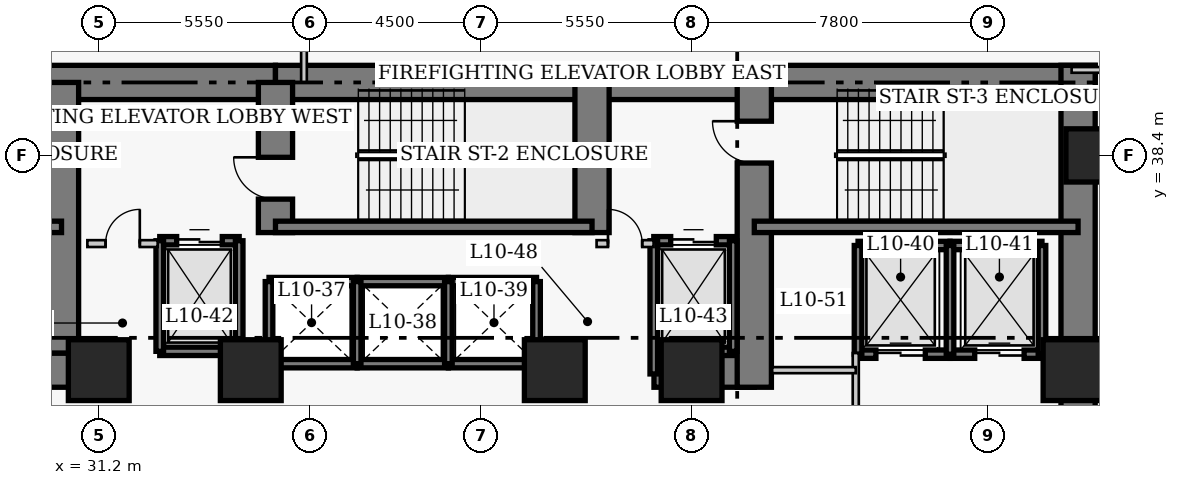
"""IFC4 building model, lengths in metres.
Left out: names, types, materials, properties, quantities, classifications, styles, units other than length and angle.
Written with IfcOpenShell. Run it as: python <this file> out.ifc"""

import sys

from ifc_helpers import new_model, si_unit, direction, frame, frame_2d, origin, origin_2d, place, context, subcontext, project, spatial, rectangle, extrude, element, fill, save


model = new_model("IFC4")
c1 = context("Model", 3, precision=1e-05, world=origin(), true_north=direction((0.0, 1.0)))
c2 = subcontext(c1, "Body", "Model", "MODEL_VIEW")
j1 = project(units=[si_unit("LENGTHUNIT", "METRE"), si_unit("PLANEANGLEUNIT", "RADIAN")], contexts=[c1])
p1 = place(None, origin())
s1 = spatial("IfcSite", under=j1, at=p1, CompositionType="ELEMENT")
p2 = place(p1, origin())
s2 = spatial("IfcBuilding", under=s1, at=p2, CompositionType="ELEMENT")
p3 = place(p2, frame((0.0, 0.0, 45.0)))
s3 = spatial("IfcBuildingStorey", under=s2, at=p3, CompositionType="ELEMENT", Elevation=45.0)
p4 = place(p3, frame((21.45, 40.32, 0.0), z_axis=(0.0, 0.0, 1.0), x_axis=(1.0, 0.0, 0.0)))
e1 = element("IfcWall", 1, at=p4, inside=s3, PredefinedType="SHEAR", context=c2, shape_type="SweptSolid", body=[
    extrude(rectangle(XDim=14.4, YDim=0.9, at=frame_2d((7.2, 0.0))), origin(), (0.0, 0.0, 1.0), 3.8),
])
p5 = place(p3, frame((35.85, 40.32, 0.0), z_axis=(0.0, 0.0, 1.0), x_axis=(1.0, 0.0, 0.0)))
e2 = element("IfcWall", 2, at=p5, inside=s3, PredefinedType="SHEAR", context=c2, shape_type="SweptSolid", body=[
    extrude(rectangle(XDim=12.6, YDim=0.9, at=frame_2d((6.3, 0.0))), origin(), (0.0, 0.0, 1.0), 3.8),
])
p6 = place(p3, frame((48.45, 40.32, 0.0), z_axis=(0.0, 0.0, 1.0), x_axis=(1.0, 0.0, 0.0)))
e3 = element("IfcWall", 3, at=p6, inside=s3, PredefinedType="SHEAR", context=c2, shape_type="SweptSolid", body=[
    extrude(rectangle(XDim=8.97, YDim=0.9, at=frame_2d((4.485, 0.0))), origin(), (0.0, 0.0, 1.0), 3.8),
])
p7 = place(p3, frame((56.97, 27.05, 0.0), z_axis=(0.0, 0.0, 1.0), x_axis=(0.0, 1.0, 0.0)))
e4 = element("IfcWall", 4, at=p7, inside=s3, PredefinedType="SHEAR", context=c2, shape_type="SweptSolid", body=[
    extrude(rectangle(XDim=13.72, YDim=0.9, at=frame_2d((6.86, 0.0))), origin(), (0.0, 0.0, 1.0), 3.8),
])
p8 = place(p3, frame((28.45, 32.75, 0.0), z_axis=(0.0, 0.0, 1.0), x_axis=(1.0, 0.0, 0.0)))
e5 = element("IfcWall", 5, at=p8, inside=s3, PredefinedType="SHEAR", context=c2, shape_type="SweptSolid", body=[
    extrude(rectangle(XDim=2.4, YDim=0.9, at=frame_2d((1.2, 0.0))), origin(), (0.0, 0.0, 1.0), 3.8),
])
p9 = place(p3, frame((45.81, 32.75, 0.0), z_axis=(0.0, 0.0, 1.0), x_axis=(1.0, 0.0, 0.0)))
e6 = element("IfcWall", 6, at=p9, inside=s3, PredefinedType="SHEAR", context=c2, shape_type="SweptSolid", body=[
    extrude(rectangle(XDim=2.64, YDim=0.9, at=frame_2d((1.32, 0.0))), origin(), (0.0, 0.0, 1.0), 3.8),
])
p10 = place(p3, frame((30.22, 33.2, 0.0), z_axis=(0.0, 0.0, 1.0), x_axis=(0.0, 1.0, 0.0)))
e7 = element("IfcWall", 7, at=p10, inside=s3, PredefinedType="SHEAR", context=c2, shape_type="SweptSolid", body=[
    extrude(rectangle(XDim=7.12, YDim=0.9, at=frame_2d((3.56, 0.0))), origin(), (0.0, 0.0, 1.0), 3.8),
])
p11 = place(p3, frame((35.85, 36.37, 0.0), z_axis=(0.0, 0.0, 1.0), x_axis=(0.0, 1.0, 0.0)))
e8 = element("IfcWall", 8, at=p11, inside=s3, PredefinedType="SHEAR", context=c2, shape_type="SweptSolid", body=[
    extrude(rectangle(XDim=3.95, YDim=0.9, at=frame_2d((1.975, 0.0))), origin(), (0.0, 0.0, 1.0), 3.8),
])
p12 = place(p11, frame((0.88, 0.0, 0.0)))
e9 = element("IfcOpeningElement", 9, at=p12, cuts=e8, PredefinedType="OPENING", context=c2, shape_type="SweptSolid", body=[
    extrude(rectangle(XDim=1.1, YDim=2.15, at=frame_2d((0.55, 1.075))), frame((0.0, 0.46, 0.0), z_axis=(0.0, -1.0, 0.0), x_axis=(1.0, 0.0, 0.0)), (0.0, 0.0, 1.0), 0.92),
])
p13 = place(p3, frame((44.18, 36.37, 0.0), z_axis=(0.0, 0.0, 1.0), x_axis=(0.0, 1.0, 0.0)))
e10 = element("IfcWall", 10, at=p13, inside=s3, PredefinedType="SHEAR", context=c2, shape_type="SweptSolid", body=[
    extrude(rectangle(XDim=3.95, YDim=0.9, at=frame_2d((1.975, 0.0))), origin(), (0.0, 0.0, 1.0), 3.8),
])
p14 = place(p3, frame((48.45, 32.3, 0.0), z_axis=(0.0, 0.0, 1.0), x_axis=(0.0, 1.0, 0.0)))
e11 = element("IfcWall", 11, at=p14, inside=s3, PredefinedType="SHEAR", context=c2, shape_type="SweptSolid", body=[
    extrude(rectangle(XDim=8.02, YDim=0.9, at=frame_2d((4.01, 0.0))), origin(), (0.0, 0.0, 1.0), 3.8),
])
p15 = place(p14, frame((5.9, 0.0, 0.0)))
e12 = element("IfcOpeningElement", 12, at=p15, cuts=e11, PredefinedType="OPENING", context=c2, shape_type="SweptSolid", body=[
    extrude(rectangle(XDim=1.1, YDim=2.15, at=frame_2d((0.55, 1.075))), frame((0.0, 0.46, 0.0), z_axis=(0.0, -1.0, 0.0), x_axis=(1.0, 0.0, 0.0)), (0.0, 0.0, 1.0), 0.92),
])
p16 = place(p3, frame((21.9, 36.52, 0.0), z_axis=(0.0, 0.0, 1.0), x_axis=(1.0, 0.0, 0.0)))
e13 = element("IfcWall", 13, at=p16, inside=s3, PredefinedType="SHEAR", context=c2, shape_type="SweptSolid", body=[
    extrude(rectangle(XDim=8.32, YDim=0.3, at=frame_2d((4.16, 0.0))), origin(), (0.0, 0.0, 1.0), 3.8),
])
p17 = place(p16, frame((0.9, 0.0, 0.0)))
e14 = element("IfcOpeningElement", 14, at=p17, cuts=e13, PredefinedType="OPENING", context=c2, shape_type="SweptSolid", body=[
    extrude(rectangle(XDim=1.1, YDim=2.15, at=frame_2d((0.55, 1.075))), frame((0.0, 0.16, 0.0), z_axis=(0.0, -1.0, 0.0), x_axis=(1.0, 0.0, 0.0)), (0.0, 0.0, 1.0), 0.32),
])
p18 = place(p3, frame((35.85, 36.52, 0.0), z_axis=(0.0, 0.0, 1.0), x_axis=(1.0, 0.0, 0.0)))
e15 = element("IfcWall", 15, at=p18, inside=s3, PredefinedType="SHEAR", context=c2, shape_type="SweptSolid", body=[
    extrude(rectangle(XDim=8.33, YDim=0.3, at=frame_2d((4.165, 0.0))), origin(), (0.0, 0.0, 1.0), 3.8),
])
p19 = place(p3, frame((48.45, 36.52, 0.0), z_axis=(0.0, 0.0, 1.0), x_axis=(1.0, 0.0, 0.0)))
e16 = element("IfcWall", 16, at=p19, inside=s3, PredefinedType="SHEAR", context=c2, shape_type="SweptSolid", body=[
    extrude(rectangle(XDim=8.52, YDim=0.3, at=frame_2d((4.26, 0.0))), origin(), (0.0, 0.0, 1.0), 3.8),
])
p20 = place(p3, frame((57.35, 38.4, 0.0), z_axis=(0.0, 0.0, 1.0), x_axis=(1.0, 0.0, 0.0)))
e17 = element("IfcColumn", 17, at=p20, inside=s3, PredefinedType="COLUMN", context=c2, shape_type="SweptSolid", body=[
    extrude(rectangle(XDim=1.4, YDim=1.4, at=origin_2d()), origin(), (0.0, 0.0, 1.0), 3.8),
])
for number, where, z_axis, x_axis in (
    (18, (31.2, 32.75, 0.0), (0.0, 0.0, 1.0), (1.0, 0.0, 0.0)),
    (19, (35.2, 32.75, 0.0), (0.0, 0.0, 1.0), (1.0, 0.0, 0.0)),
    (20, (43.2, 32.75, 0.0), (0.0, 0.0, 1.0), (1.0, 0.0, 0.0)),
    (21, (46.8, 32.75, 0.0), (0.0, 0.0, 1.0), (1.0, 0.0, 0.0)),
    (22, (56.85, 32.75, 0.0), (0.0, 0.0, 1.0), (1.0, 0.0, 0.0)),
):
    element("IfcColumn", number, at=place(p3, frame(where, z_axis=z_axis, x_axis=x_axis)), inside=s3, PredefinedType="COLUMN", context=c2, shape_type="SweptSolid", body=[
        extrude(rectangle(XDim=1.6, YDim=1.6, at=origin_2d()), origin(), (0.0, 0.0, 1.0), 3.8),
    ])
for number, where, z_axis, x_axis in (
    (23, (35.68, 35.08, 0.0), (0.0, 0.0, 1.0), (1.0, 0.0, 0.0)),
    (24, (35.68, 32.92, 0.0), (0.0, 0.0, 1.0), (1.0, 0.0, 0.0)),
):
    element("IfcWall", number, at=place(p3, frame(where, z_axis=z_axis, x_axis=x_axis)), inside=s3, PredefinedType="SHEAR", context=c2, shape_type="SweptSolid", body=[
        extrude(rectangle(XDim=2.32, YDim=0.22, at=frame_2d((1.16, 0.0))), origin(), (0.0, 0.0, 1.0), 3.8),
    ])
p21 = place(p3, frame((35.68, 32.92, 0.0), z_axis=(0.0, 0.0, 1.0), x_axis=(0.0, 1.0, 0.0)))
e25 = element("IfcWall", 25, at=p21, inside=s3, PredefinedType="SHEAR", context=c2, shape_type="SweptSolid", body=[
    extrude(rectangle(XDim=2.16, YDim=0.2, at=frame_2d((1.08, 0.0))), origin(), (0.0, 0.0, 1.0), 3.8),
])
for number, where, z_axis, x_axis in (
    (26, (38.0, 35.08, 0.0), (0.0, 0.0, 1.0), (1.0, 0.0, 0.0)),
    (27, (38.0, 32.92, 0.0), (0.0, 0.0, 1.0), (1.0, 0.0, 0.0)),
):
    element("IfcWall", number, at=place(p3, frame(where, z_axis=z_axis, x_axis=x_axis)), inside=s3, PredefinedType="SHEAR", context=c2, shape_type="SweptSolid", body=[
        extrude(rectangle(XDim=2.4, YDim=0.22, at=frame_2d((1.2, 0.0))), origin(), (0.0, 0.0, 1.0), 3.8),
    ])
p22 = place(p3, frame((38.0, 32.92, 0.0), z_axis=(0.0, 0.0, 1.0), x_axis=(0.0, 1.0, 0.0)))
e28 = element("IfcWall", 28, at=p22, inside=s3, PredefinedType="SHEAR", context=c2, shape_type="SweptSolid", body=[
    extrude(rectangle(XDim=2.16, YDim=0.2, at=frame_2d((1.08, 0.0))), origin(), (0.0, 0.0, 1.0), 3.8),
])
for number, where, z_axis, x_axis in (
    (29, (40.4, 35.08, 0.0), (0.0, 0.0, 1.0), (1.0, 0.0, 0.0)),
    (30, (40.4, 32.92, 0.0), (0.0, 0.0, 1.0), (1.0, 0.0, 0.0)),
):
    element("IfcWall", number, at=place(p3, frame(where, z_axis=z_axis, x_axis=x_axis)), inside=s3, PredefinedType="SHEAR", context=c2, shape_type="SweptSolid", body=[
        extrude(rectangle(XDim=2.32, YDim=0.22, at=frame_2d((1.16, 0.0))), origin(), (0.0, 0.0, 1.0), 3.8),
    ])
for number, where, z_axis, x_axis in (
    (31, (40.4, 32.92, 0.0), (0.0, 0.0, 1.0), (0.0, 1.0, 0.0)),
    (32, (42.72, 32.92, 0.0), (0.0, 0.0, 1.0), (0.0, 1.0, 0.0)),
):
    element("IfcWall", number, at=place(p3, frame(where, z_axis=z_axis, x_axis=x_axis)), inside=s3, PredefinedType="SHEAR", context=c2, shape_type="SweptSolid", body=[
        extrude(rectangle(XDim=2.16, YDim=0.2, at=frame_2d((1.08, 0.0))), origin(), (0.0, 0.0, 1.0), 3.8),
    ])
p23 = place(p3, frame((51.18, 36.03, 0.0), z_axis=(0.0, 0.0, 1.0), x_axis=(1.0, 0.0, 0.0)))
e33 = element("IfcWall", 33, at=p23, inside=s3, PredefinedType="SHEAR", context=c2, shape_type="SweptSolid", body=[
    extrude(rectangle(XDim=2.42, YDim=0.22, at=frame_2d((1.21, 0.0))), origin(), (0.0, 0.0, 1.0), 3.8),
])
p24 = place(p3, frame((51.18, 33.17, 0.0), z_axis=(0.0, 0.0, 1.0), x_axis=(1.0, 0.0, 0.0)))
e34 = element("IfcWall", 34, at=p24, inside=s3, PredefinedType="SHEAR", context=c2, shape_type="SweptSolid", body=[
    extrude(rectangle(XDim=2.42, YDim=0.22, at=frame_2d((1.21, 0.0))), origin(), (0.0, 0.0, 1.0), 3.8),
])
p25 = place(p24, frame((0.47, 0.0, 0.0)))
e35 = element("IfcOpeningElement", 35, at=p25, cuts=e34, PredefinedType="OPENING", context=c2, shape_type="SweptSolid", body=[
    extrude(rectangle(XDim=1.3, YDim=2.15, at=frame_2d((0.65, 1.075))), frame((0.0, 0.12, 0.0), z_axis=(0.0, -1.0, 0.0), x_axis=(1.0, 0.0, 0.0)), (0.0, 0.0, 1.0), 0.24),
])
p26 = place(p3, frame((51.18, 33.17, 0.0), z_axis=(0.0, 0.0, 1.0), x_axis=(0.0, 1.0, 0.0)))
e36 = element("IfcWall", 36, at=p26, inside=s3, PredefinedType="SHEAR", context=c2, shape_type="SweptSolid", body=[
    extrude(rectangle(XDim=2.86, YDim=0.2, at=frame_2d((1.43, 0.0))), origin(), (0.0, 0.0, 1.0), 3.8),
])
p27 = place(p3, frame((53.6, 36.03, 0.0), z_axis=(0.0, 0.0, 1.0), x_axis=(1.0, 0.0, 0.0)))
e37 = element("IfcWall", 37, at=p27, inside=s3, PredefinedType="SHEAR", context=c2, shape_type="SweptSolid", body=[
    extrude(rectangle(XDim=2.42, YDim=0.22, at=frame_2d((1.21, 0.0))), origin(), (0.0, 0.0, 1.0), 3.8),
])
p28 = place(p3, frame((53.6, 33.17, 0.0), z_axis=(0.0, 0.0, 1.0), x_axis=(1.0, 0.0, 0.0)))
e38 = element("IfcWall", 38, at=p28, inside=s3, PredefinedType="SHEAR", context=c2, shape_type="SweptSolid", body=[
    extrude(rectangle(XDim=2.42, YDim=0.22, at=frame_2d((1.21, 0.0))), origin(), (0.0, 0.0, 1.0), 3.8),
])
p29 = place(p28, frame((0.65, 0.0, 0.0)))
e39 = element("IfcOpeningElement", 39, at=p29, cuts=e38, PredefinedType="OPENING", context=c2, shape_type="SweptSolid", body=[
    extrude(rectangle(XDim=1.3, YDim=2.15, at=frame_2d((0.65, 1.075))), frame((0.0, 0.12, 0.0), z_axis=(0.0, -1.0, 0.0), x_axis=(1.0, 0.0, 0.0)), (0.0, 0.0, 1.0), 0.24),
])
for number, where, z_axis, x_axis in (
    (40, (53.6, 33.17, 0.0), (0.0, 0.0, 1.0), (0.0, 1.0, 0.0)),
    (41, (56.02, 33.17, 0.0), (0.0, 0.0, 1.0), (0.0, 1.0, 0.0)),
):
    element("IfcWall", number, at=place(p3, frame(where, z_axis=z_axis, x_axis=x_axis)), inside=s3, PredefinedType="SHEAR", context=c2, shape_type="SweptSolid", body=[
        extrude(rectangle(XDim=2.86, YDim=0.2, at=frame_2d((1.43, 0.0))), origin(), (0.0, 0.0, 1.0), 3.8),
    ])
p30 = place(p3, frame((32.805, 36.155, 0.0), z_axis=(0.0, 0.0, 1.0), x_axis=(1.0, 0.0, 0.0)))
e42 = element("IfcWall", 42, at=p30, inside=s3, PredefinedType="SHEAR", context=c2, shape_type="SweptSolid", body=[
    extrude(rectangle(XDim=2.09, YDim=0.22, at=frame_2d((1.045, 0.0))), origin(), (0.0, 0.0, 1.0), 3.8),
])
p31 = place(p30, frame((0.445, 0.0, 0.0)))
e43 = element("IfcOpeningElement", 43, at=p31, cuts=e42, PredefinedType="OPENING", context=c2, shape_type="SweptSolid", body=[
    extrude(rectangle(XDim=1.2, YDim=2.15, at=frame_2d((0.6, 1.075))), frame((0.0, 0.12, 0.0), z_axis=(0.0, -1.0, 0.0), x_axis=(1.0, 0.0, 0.0)), (0.0, 0.0, 1.0), 0.24),
])
p32 = place(p3, frame((32.805, 33.245, 0.0), z_axis=(0.0, 0.0, 1.0), x_axis=(1.0, 0.0, 0.0)))
e44 = element("IfcWall", 44, at=p32, inside=s3, PredefinedType="SHEAR", context=c2, shape_type="SweptSolid", body=[
    extrude(rectangle(XDim=2.09, YDim=0.22, at=frame_2d((1.045, 0.0))), origin(), (0.0, 0.0, 1.0), 3.8),
])
for number, where, z_axis, x_axis in (
    (45, (32.805, 33.245, 0.0), (0.0, 0.0, 1.0), (0.0, 1.0, 0.0)),
    (46, (34.895, 33.245, 0.0), (0.0, 0.0, 1.0), (0.0, 1.0, 0.0)),
):
    element("IfcWall", number, at=place(p3, frame(where, z_axis=z_axis, x_axis=x_axis)), inside=s3, PredefinedType="SHEAR", context=c2, shape_type="SweptSolid", body=[
        extrude(rectangle(XDim=2.91, YDim=0.2, at=frame_2d((1.455, 0.0))), origin(), (0.0, 0.0, 1.0), 3.8),
    ])
p33 = place(p3, frame((45.805, 36.155, 0.0), z_axis=(0.0, 0.0, 1.0), x_axis=(1.0, 0.0, 0.0)))
e47 = element("IfcWall", 47, at=p33, inside=s3, PredefinedType="SHEAR", context=c2, shape_type="SweptSolid", body=[
    extrude(rectangle(XDim=2.09, YDim=0.22, at=frame_2d((1.045, 0.0))), origin(), (0.0, 0.0, 1.0), 3.8),
])
p34 = place(p33, frame((0.445, 0.0, 0.0)))
e48 = element("IfcOpeningElement", 48, at=p34, cuts=e47, PredefinedType="OPENING", context=c2, shape_type="SweptSolid", body=[
    extrude(rectangle(XDim=1.2, YDim=2.15, at=frame_2d((0.6, 1.075))), frame((0.0, 0.12, 0.0), z_axis=(0.0, -1.0, 0.0), x_axis=(1.0, 0.0, 0.0)), (0.0, 0.0, 1.0), 0.24),
])
p35 = place(p3, frame((45.805, 33.245, 0.0), z_axis=(0.0, 0.0, 1.0), x_axis=(1.0, 0.0, 0.0)))
e49 = element("IfcWall", 49, at=p35, inside=s3, PredefinedType="SHEAR", context=c2, shape_type="SweptSolid", body=[
    extrude(rectangle(XDim=2.09, YDim=0.22, at=frame_2d((1.045, 0.0))), origin(), (0.0, 0.0, 1.0), 3.8),
])
p36 = place(p3, frame((45.805, 32.65, 0.0), z_axis=(0.0, 0.0, 1.0), x_axis=(0.0, 1.0, 0.0)))
e50 = element("IfcWall", 50, at=p36, inside=s3, PredefinedType="SHEAR", context=c2, shape_type="SweptSolid", body=[
    extrude(rectangle(XDim=3.505, YDim=0.2, at=frame_2d((1.752, 0.0))), origin(), (0.0, 0.0, 1.0), 3.8),
])
p37 = place(p3, frame((47.895, 33.245, 0.0), z_axis=(0.0, 0.0, 1.0), x_axis=(0.0, 1.0, 0.0)))
e51 = element("IfcWall", 51, at=p37, inside=s3, PredefinedType="SHEAR", context=c2, shape_type="SweptSolid", body=[
    extrude(rectangle(XDim=2.91, YDim=0.2, at=frame_2d((1.455, 0.0))), origin(), (0.0, 0.0, 1.0), 3.8),
])
p38 = place(p3, frame((30.9, 36.08, 0.0), z_axis=(0.0, 0.0, 1.0), x_axis=(1.0, 0.0, 0.0)))
e52 = element("IfcWall", 52, at=p38, inside=s3, PredefinedType="PARTITIONING", context=c2, shape_type="SweptSolid", body=[
    extrude(rectangle(XDim=1.85, YDim=0.18, at=frame_2d((0.925, 0.0))), origin(), (0.0, 0.0, 1.0), 3.54),
])
p39 = place(p38, frame((0.48, 0.0, 0.0)))
e53 = element("IfcOpeningElement", 53, at=p39, cuts=e52, PredefinedType="OPENING", context=c2, shape_type="SweptSolid", body=[
    extrude(rectangle(XDim=0.9, YDim=2.15, at=frame_2d((0.45, 1.075))), frame((0.0, 0.1, 0.0), z_axis=(0.0, -1.0, 0.0), x_axis=(1.0, 0.0, 0.0)), (0.0, 0.0, 1.0), 0.2),
])
p40 = place(p3, frame((44.3, 36.08, 0.0), z_axis=(0.0, 0.0, 1.0), x_axis=(1.0, 0.0, 0.0)))
e54 = element("IfcWall", 54, at=p40, inside=s3, PredefinedType="PARTITIONING", context=c2, shape_type="SweptSolid", body=[
    extrude(rectangle(XDim=1.5, YDim=0.18, at=frame_2d((0.75, 0.0))), origin(), (0.0, 0.0, 1.0), 3.54),
])
p41 = place(p40, frame((0.3, 0.0, 0.0)))
e55 = element("IfcOpeningElement", 55, at=p41, cuts=e54, PredefinedType="OPENING", context=c2, shape_type="SweptSolid", body=[
    extrude(rectangle(XDim=0.9, YDim=2.15, at=frame_2d((0.45, 1.075))), frame((0.0, 0.1, 0.0), z_axis=(0.0, -1.0, 0.0), x_axis=(1.0, 0.0, 0.0)), (0.0, 0.0, 1.0), 0.2),
])
p42 = place(p3, frame((51.12, 29.5, 0.0), z_axis=(0.0, 0.0, 1.0), x_axis=(0.0, 1.0, 0.0)))
e56 = element("IfcWall", 56, at=p42, inside=s3, PredefinedType="PARTITIONING", context=c2, shape_type="SweptSolid", body=[
    extrude(rectangle(XDim=3.7, YDim=0.16, at=frame_2d((1.85, 0.0))), origin(), (0.0, 0.0, 1.0), 3.54),
])
p43 = place(p42, frame((0.9, 0.0, 0.0)))
e57 = element("IfcOpeningElement", 57, at=p43, cuts=e56, PredefinedType="OPENING", context=c2, shape_type="SweptSolid", body=[
    extrude(rectangle(XDim=1.1, YDim=2.15, at=frame_2d((0.55, 1.075))), frame((0.0, 0.09, 0.0), z_axis=(0.0, -1.0, 0.0), x_axis=(1.0, 0.0, 0.0)), (0.0, 0.0, 1.0), 0.18),
])
p44 = place(p3, frame((48.92, 32.75, 0.0), z_axis=(0.0, 0.0, 1.0), x_axis=(1.0, 0.0, 0.0)))
e58 = element("IfcWall", 58, at=p44, inside=s3, PredefinedType="PARTITIONING", context=c2, shape_type="SweptSolid", body=[
    extrude(rectangle(XDim=2.2, YDim=0.16, at=frame_2d((1.1, 0.0))), origin(), (0.0, 0.0, 1.0), 3.54),
])
p45 = place(p3, frame((56.8, 40.65, 0.0), z_axis=(0.0, 0.0, 1.0), x_axis=(1.0, 0.0, 0.0)))
e59 = element("IfcWall", 59, at=p45, inside=s3, PredefinedType="PARTITIONING", context=c2, shape_type="SweptSolid", body=[
    extrude(rectangle(XDim=4.01, YDim=0.15, at=frame_2d((2.005, 0.0))), origin(), (0.0, 0.0, 1.0), 3.54),
])
p46 = place(p45, frame((2.4, 0.0, 0.0)))
e60 = element("IfcOpeningElement", 60, at=p46, cuts=e59, PredefinedType="OPENING", context=c2, shape_type="SweptSolid", body=[
    extrude(rectangle(XDim=1.0, YDim=2.15, at=frame_2d((0.5, 1.075))), frame((0.0, 0.085, 0.0), z_axis=(0.0, -1.0, 0.0), x_axis=(1.0, 0.0, 0.0)), (0.0, 0.0, 1.0), 0.17),
])
p47 = place(p3, frame((36.6, 40.32, 0.0), z_axis=(0.0, 0.0, 1.0), x_axis=(0.0, 1.0, 0.0)))
e61 = element("IfcWall", 61, at=p47, inside=s3, PredefinedType="PARTITIONING", context=c2, shape_type="SweptSolid", body=[
    extrude(rectangle(XDim=5.045, YDim=0.15, at=frame_2d((2.522, 0.0))), origin(), (0.0, 0.0, 1.0), 3.54),
])
p48 = place(p25, origin())
e62 = element("IfcDoor", 62, at=p48, inside=s3, OperationType="DOUBLE_DOOR_SLIDING", PredefinedType="DOOR", context=c2, shape_type="SweptSolid", body=[
    extrude(rectangle(XDim=1.3, YDim=2.15, at=frame_2d((0.65, 1.075))), frame((0.0, 0.025, 0.0), z_axis=(0.0, -1.0, 0.0), x_axis=(1.0, 0.0, 0.0)), (0.0, 0.0, 1.0), 0.05),
])
fill(e35, e62)
p49 = place(p29, origin())
e63 = element("IfcDoor", 63, at=p49, inside=s3, OperationType="DOUBLE_DOOR_SLIDING", PredefinedType="DOOR", context=c2, shape_type="SweptSolid", body=[
    extrude(rectangle(XDim=1.3, YDim=2.15, at=frame_2d((0.65, 1.075))), frame((0.0, 0.025, 0.0), z_axis=(0.0, -1.0, 0.0), x_axis=(1.0, 0.0, 0.0)), (0.0, 0.0, 1.0), 0.05),
])
fill(e39, e63)
p50 = place(p31, origin())
e64 = element("IfcDoor", 64, at=p50, inside=s3, OperationType="DOUBLE_DOOR_SLIDING", PredefinedType="DOOR", context=c2, shape_type="SweptSolid", body=[
    extrude(rectangle(XDim=1.2, YDim=2.15, at=frame_2d((0.6, 1.075))), frame((0.0, 0.025, 0.0), z_axis=(0.0, -1.0, 0.0), x_axis=(1.0, 0.0, 0.0)), (0.0, 0.0, 1.0), 0.05),
])
fill(e43, e64)
p51 = place(p34, origin())
e65 = element("IfcDoor", 65, at=p51, inside=s3, OperationType="DOUBLE_DOOR_SLIDING", PredefinedType="DOOR", context=c2, shape_type="SweptSolid", body=[
    extrude(rectangle(XDim=1.2, YDim=2.15, at=frame_2d((0.6, 1.075))), frame((0.0, 0.025, 0.0), z_axis=(0.0, -1.0, 0.0), x_axis=(1.0, 0.0, 0.0)), (0.0, 0.0, 1.0), 0.05),
])
fill(e48, e65)
p52 = place(p39, origin())
e66 = element("IfcDoor", 66, at=p52, inside=s3, OperationType="SINGLE_SWING_RIGHT", PredefinedType="DOOR", context=c2, shape_type="SweptSolid", body=[
    extrude(rectangle(XDim=0.9, YDim=2.15, at=frame_2d((0.45, 1.075))), frame((0.0, 0.025, 0.0), z_axis=(0.0, -1.0, 0.0), x_axis=(1.0, 0.0, 0.0)), (0.0, 0.0, 1.0), 0.05),
])
fill(e53, e66)
p53 = place(p41, origin())
e67 = element("IfcDoor", 67, at=p53, inside=s3, OperationType="SINGLE_SWING_LEFT", PredefinedType="DOOR", context=c2, shape_type="SweptSolid", body=[
    extrude(rectangle(XDim=0.9, YDim=2.15, at=frame_2d((0.45, 1.075))), frame((0.0, 0.025, 0.0), z_axis=(0.0, -1.0, 0.0), x_axis=(1.0, 0.0, 0.0)), (0.0, 0.0, 1.0), 0.05),
])
fill(e55, e67)
p54 = place(p12, origin())
e68 = element("IfcDoor", 68, at=p54, inside=s3, OperationType="SINGLE_SWING_RIGHT", PredefinedType="DOOR", context=c2, shape_type="SweptSolid", body=[
    extrude(rectangle(XDim=1.1, YDim=2.15, at=frame_2d((0.55, 1.075))), frame((0.0, 0.025, 0.0), z_axis=(0.0, -1.0, 0.0), x_axis=(1.0, 0.0, 0.0)), (0.0, 0.0, 1.0), 0.05),
])
fill(e9, e68)
p55 = place(p15, origin())
e69 = element("IfcDoor", 69, at=p55, inside=s3, OperationType="SINGLE_SWING_RIGHT", PredefinedType="DOOR", context=c2, shape_type="SweptSolid", body=[
    extrude(rectangle(XDim=1.1, YDim=2.15, at=frame_2d((0.55, 1.075))), frame((0.0, 0.025, 0.0), z_axis=(0.0, -1.0, 0.0), x_axis=(1.0, 0.0, 0.0)), (0.0, 0.0, 1.0), 0.05),
])
fill(e12, e69)
save(model, sys.argv[1])
